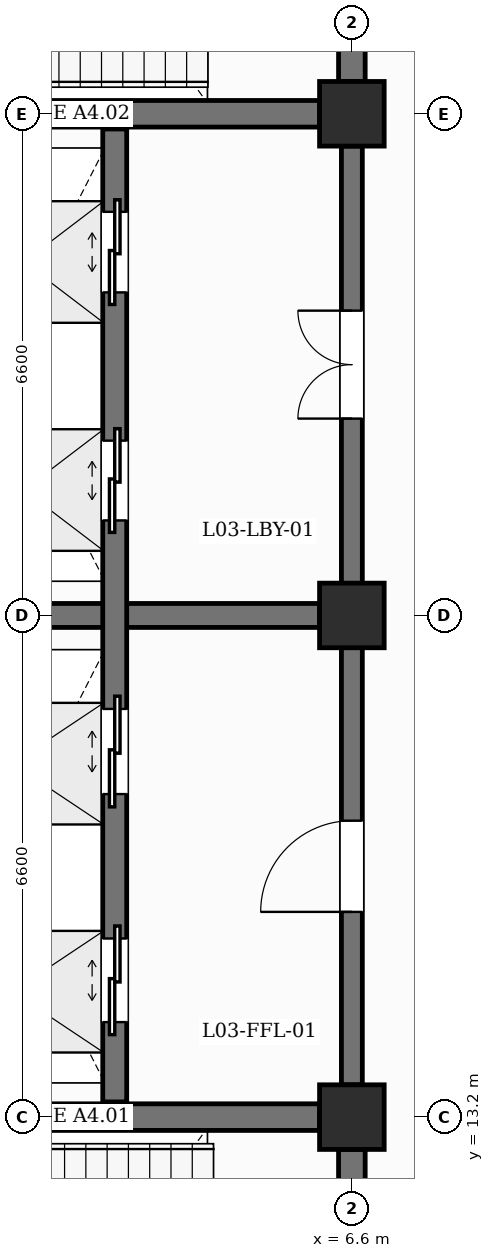
"""IFC4 building model, lengths in metres.
Left out: names, types, materials, properties, quantities, classifications, styles, units other than length and angle.
Written with IfcOpenShell. Run it as: python <this file> out.ifc"""

import sys

from ifc_helpers import new_model, si_unit, direction, frame, frame_2d, origin, origin_2d, place, context, subcontext, project, spatial, rectangle, extrude, element, fill, save


model = new_model("IFC4")
c1 = context("Model", 3, precision=1e-05, world=origin(), true_north=direction((0.0, 1.0)))
c2 = subcontext(c1, "Body", "Model", "MODEL_VIEW")
j1 = project(units=[si_unit("LENGTHUNIT", "METRE"), si_unit("PLANEANGLEUNIT", "RADIAN")], contexts=[c1])
p1 = place(None, origin())
s1 = spatial("IfcSite", under=j1, at=p1, CompositionType="ELEMENT")
p2 = place(p1, origin())
s2 = spatial("IfcBuilding", under=s1, at=p2, CompositionType="ELEMENT")
p3 = place(p2, frame((0.0, 0.0, 14.4)))
s3 = spatial("IfcBuildingStorey", under=s2, at=p3, CompositionType="ELEMENT", Elevation=14.4)
for number, where, z_axis, x_axis in (
    (1, (6.6, 13.2, 0.0), (0.0, 0.0, 1.0), (1.0, 0.0, 0.0)),
    (2, (6.6, 19.8, 0.0), (0.0, 0.0, 1.0), (1.0, 0.0, 0.0)),
    (3, (6.6, 26.4, 0.0), (0.0, 0.0, 1.0), (1.0, 0.0, 0.0)),
):
    element("IfcColumn", number, at=place(p3, frame(where, z_axis=z_axis, x_axis=x_axis)), inside=s3, PredefinedType="COLUMN", context=c2, shape_type="SweptSolid", body=[
        extrude(rectangle(XDim=0.85, YDim=0.85, at=origin_2d()), origin(), (0.0, 0.0, 1.0), 4.2),
    ])
p4 = place(p3, frame((0.425, 13.2, 0.0), z_axis=(0.0, 0.0, 1.0), x_axis=(1.0, 0.0, 0.0)))
e4 = element("IfcWall", 4, at=p4, inside=s3, PredefinedType="SHEAR", context=c2, shape_type="SweptSolid", body=[
    extrude(rectangle(XDim=5.75, YDim=0.35, at=frame_2d((2.875, 0.0))), origin(), (0.0, 0.0, 1.0), 3.16),
])
p5 = place(p3, frame((6.6, 7.025, 0.0), z_axis=(0.0, 0.0, 1.0), x_axis=(0.0, 1.0, 0.0)))
e5 = element("IfcWall", 5, at=p5, inside=s3, PredefinedType="SHEAR", context=c2, shape_type="SweptSolid", body=[
    extrude(rectangle(XDim=5.75, YDim=0.35, at=frame_2d((2.875, 0.0))), origin(), (0.0, 0.0, 1.0), 3.16),
])
p6 = place(p5, frame((2.325, 0.0, 0.0)))
e6 = element("IfcOpeningElement", 6, at=p6, cuts=e5, PredefinedType="OPENING", context=c2, shape_type="SweptSolid", body=[
    extrude(rectangle(XDim=1.1, YDim=2.15, at=frame_2d((0.55, 1.075))), frame((0.0, 0.185, 0.0), z_axis=(0.0, -1.0, 0.0), x_axis=(1.0, 0.0, 0.0)), (0.0, 0.0, 1.0), 0.37),
])
p7 = place(p3, frame((0.425, 26.4, 0.0), z_axis=(0.0, 0.0, 1.0), x_axis=(1.0, 0.0, 0.0)))
e7 = element("IfcWall", 7, at=p7, inside=s3, PredefinedType="SHEAR", context=c2, shape_type="SweptSolid", body=[
    extrude(rectangle(XDim=5.75, YDim=0.35, at=frame_2d((2.875, 0.0))), origin(), (0.0, 0.0, 1.0), 3.16),
])
p8 = place(p3, frame((6.6, 26.825, 0.0), z_axis=(0.0, 0.0, 1.0), x_axis=(0.0, 1.0, 0.0)))
e8 = element("IfcWall", 8, at=p8, inside=s3, PredefinedType="SHEAR", context=c2, shape_type="SweptSolid", body=[
    extrude(rectangle(XDim=5.75, YDim=0.35, at=frame_2d((2.875, 0.0))), origin(), (0.0, 0.0, 1.0), 3.16),
])
p9 = place(p8, frame((2.325, 0.0, 0.0)))
e9 = element("IfcOpeningElement", 9, at=p9, cuts=e8, PredefinedType="OPENING", context=c2, shape_type="SweptSolid", body=[
    extrude(rectangle(XDim=1.1, YDim=2.15, at=frame_2d((0.55, 1.075))), frame((0.0, 0.185, 0.0), z_axis=(0.0, -1.0, 0.0), x_axis=(1.0, 0.0, 0.0)), (0.0, 0.0, 1.0), 0.37),
])
p10 = place(p3, frame((0.425, 19.8, 0.0), z_axis=(0.0, 0.0, 1.0), x_axis=(1.0, 0.0, 0.0)))
e10 = element("IfcWall", 10, at=p10, inside=s3, PredefinedType="SHEAR", context=c2, shape_type="SweptSolid", body=[
    extrude(rectangle(XDim=5.75, YDim=0.315, at=frame_2d((2.875, 0.0))), origin(), (0.0, 0.0, 1.0), 3.16),
])
p11 = place(p3, frame((6.6, 13.625, 0.0), z_axis=(0.0, 0.0, 1.0), x_axis=(0.0, 1.0, 0.0)))
e11 = element("IfcWall", 11, at=p11, inside=s3, PredefinedType="SHEAR", context=c2, shape_type="SweptSolid", body=[
    extrude(rectangle(XDim=5.75, YDim=0.275, at=frame_2d((2.875, 0.0))), origin(), (0.0, 0.0, 1.0), 3.16),
])
p12 = place(p11, frame((2.275, 0.0, 0.0)))
e12 = element("IfcOpeningElement", 12, at=p12, cuts=e11, PredefinedType="OPENING", context=c2, shape_type="SweptSolid", body=[
    extrude(rectangle(XDim=1.2, YDim=2.25, at=frame_2d((0.6, 1.125))), frame((0.0, 0.147, 0.0), z_axis=(0.0, -1.0, 0.0), x_axis=(1.0, 0.0, 0.0)), (0.0, 0.0, 1.0), 0.295),
])
p13 = place(p3, frame((6.6, 20.225, 0.0), z_axis=(0.0, 0.0, 1.0), x_axis=(0.0, 1.0, 0.0)))
e13 = element("IfcWall", 13, at=p13, inside=s3, PredefinedType="SHEAR", context=c2, shape_type="SweptSolid", body=[
    extrude(rectangle(XDim=5.75, YDim=0.275, at=frame_2d((2.875, 0.0))), origin(), (0.0, 0.0, 1.0), 3.16),
])
p14 = place(p13, frame((2.165, 0.0, 0.0)))
e14 = element("IfcOpeningElement", 14, at=p14, cuts=e13, PredefinedType="OPENING", context=c2, shape_type="SweptSolid", body=[
    extrude(rectangle(XDim=1.42, YDim=2.2, at=frame_2d((0.71, 1.1))), frame((0.0, 0.147, 0.0), z_axis=(0.0, -1.0, 0.0), x_axis=(1.0, 0.0, 0.0)), (0.0, 0.0, 1.0), 0.295),
])
p15 = place(p3, frame((3.48, 13.4, 0.0), z_axis=(0.0, 0.0, 1.0), x_axis=(0.0, 1.0, 0.0)))
e15 = element("IfcWall", 15, at=p15, inside=s3, PredefinedType="SHEAR", context=c2, shape_type="SweptSolid", body=[
    extrude(rectangle(XDim=6.2, YDim=0.315, at=frame_2d((3.1, 0.0))), origin(), (0.0, 0.0, 1.0), 3.86),
])
p16 = place(p15, frame((1.05, 0.0, 0.0)))
e16 = element("IfcOpeningElement", 16, at=p16, cuts=e15, PredefinedType="OPENING", context=c2, shape_type="SweptSolid", body=[
    extrude(rectangle(XDim=1.1, YDim=2.15, at=frame_2d((0.55, 1.075))), frame((0.0, 0.167, 0.0), z_axis=(0.0, -1.0, 0.0), x_axis=(1.0, 0.0, 0.0)), (0.0, 0.0, 1.0), 0.335),
])
p17 = place(p15, frame((4.05, 0.0, 0.0)))
e17 = element("IfcOpeningElement", 17, at=p17, cuts=e15, PredefinedType="OPENING", context=c2, shape_type="SweptSolid", body=[
    extrude(rectangle(XDim=1.12, YDim=2.15, at=frame_2d((0.56, 1.075))), frame((0.0, 0.167, 0.0), z_axis=(0.0, -1.0, 0.0), x_axis=(1.0, 0.0, 0.0)), (0.0, 0.0, 1.0), 0.335),
])
p18 = place(p3, frame((3.48, 20.0, 0.0), z_axis=(0.0, 0.0, 1.0), x_axis=(0.0, 1.0, 0.0)))
e18 = element("IfcWall", 18, at=p18, inside=s3, PredefinedType="SHEAR", context=c2, shape_type="SweptSolid", body=[
    extrude(rectangle(XDim=6.2, YDim=0.315, at=frame_2d((3.1, 0.0))), origin(), (0.0, 0.0, 1.0), 3.86),
])
p19 = place(p18, frame((1.05, 0.0, 0.0)))
e19 = element("IfcOpeningElement", 19, at=p19, cuts=e18, PredefinedType="OPENING", context=c2, shape_type="SweptSolid", body=[
    extrude(rectangle(XDim=1.05, YDim=2.15, at=frame_2d((0.525, 1.075))), frame((0.0, 0.167, 0.0), z_axis=(0.0, -1.0, 0.0), x_axis=(1.0, 0.0, 0.0)), (0.0, 0.0, 1.0), 0.335),
])
p20 = place(p18, frame((4.05, 0.0, 0.0)))
e20 = element("IfcOpeningElement", 20, at=p20, cuts=e18, PredefinedType="OPENING", context=c2, shape_type="SweptSolid", body=[
    extrude(rectangle(XDim=1.06, YDim=2.15, at=frame_2d((0.53, 1.075))), frame((0.0, 0.167, 0.0), z_axis=(0.0, -1.0, 0.0), x_axis=(1.0, 0.0, 0.0)), (0.0, 0.0, 1.0), 0.335),
])
p21 = place(p16, origin())
e21 = element("IfcDoor", 21, at=p21, inside=s3, OperationType="DOUBLE_DOOR_SLIDING", PredefinedType="USERDEFINED", context=c2, shape_type="SweptSolid", body=[
    extrude(rectangle(XDim=1.1, YDim=2.15, at=frame_2d((0.55, 1.075))), frame((0.0, 0.025, 0.0), z_axis=(0.0, -1.0, 0.0), x_axis=(1.0, 0.0, 0.0)), (0.0, 0.0, 1.0), 0.05),
])
fill(e16, e21)
p22 = place(p17, origin())
e22 = element("IfcDoor", 22, at=p22, inside=s3, OperationType="DOUBLE_DOOR_SLIDING", PredefinedType="USERDEFINED", context=c2, shape_type="SweptSolid", body=[
    extrude(rectangle(XDim=1.12, YDim=2.15, at=frame_2d((0.56, 1.075))), frame((0.0, 0.025, 0.0), z_axis=(0.0, -1.0, 0.0), x_axis=(1.0, 0.0, 0.0)), (0.0, 0.0, 1.0), 0.05),
])
fill(e17, e22)
p23 = place(p19, origin())
e23 = element("IfcDoor", 23, at=p23, inside=s3, OperationType="DOUBLE_DOOR_SLIDING", PredefinedType="USERDEFINED", context=c2, shape_type="SweptSolid", body=[
    extrude(rectangle(XDim=1.05, YDim=2.15, at=frame_2d((0.525, 1.075))), frame((0.0, 0.025, 0.0), z_axis=(0.0, -1.0, 0.0), x_axis=(1.0, 0.0, 0.0)), (0.0, 0.0, 1.0), 0.05),
])
fill(e19, e23)
p24 = place(p20, origin())
e24 = element("IfcDoor", 24, at=p24, inside=s3, OperationType="DOUBLE_DOOR_SLIDING", PredefinedType="USERDEFINED", context=c2, shape_type="SweptSolid", body=[
    extrude(rectangle(XDim=1.06, YDim=2.15, at=frame_2d((0.53, 1.075))), frame((0.0, 0.025, 0.0), z_axis=(0.0, -1.0, 0.0), x_axis=(1.0, 0.0, 0.0)), (0.0, 0.0, 1.0), 0.05),
])
fill(e20, e24)
p25 = place(p12, origin())
e25 = element("IfcDoor", 25, at=p25, inside=s3, OperationType="SINGLE_SWING_LEFT", PredefinedType="DOOR", context=c2, shape_type="SweptSolid", body=[
    extrude(rectangle(XDim=1.2, YDim=2.25, at=frame_2d((0.6, 1.125))), frame((0.0, 0.025, 0.0), z_axis=(0.0, -1.0, 0.0), x_axis=(1.0, 0.0, 0.0)), (0.0, 0.0, 1.0), 0.05),
])
fill(e12, e25)
p26 = place(p14, origin())
e26 = element("IfcDoor", 26, at=p26, inside=s3, OperationType="DOUBLE_DOOR_SINGLE_SWING", PredefinedType="DOOR", context=c2, shape_type="SweptSolid", body=[
    extrude(rectangle(XDim=1.42, YDim=2.2, at=frame_2d((0.71, 1.1))), frame((0.0, 0.025, 0.0), z_axis=(0.0, -1.0, 0.0), x_axis=(1.0, 0.0, 0.0)), (0.0, 0.0, 1.0), 0.05),
])
fill(e14, e26)
save(model, sys.argv[1])
